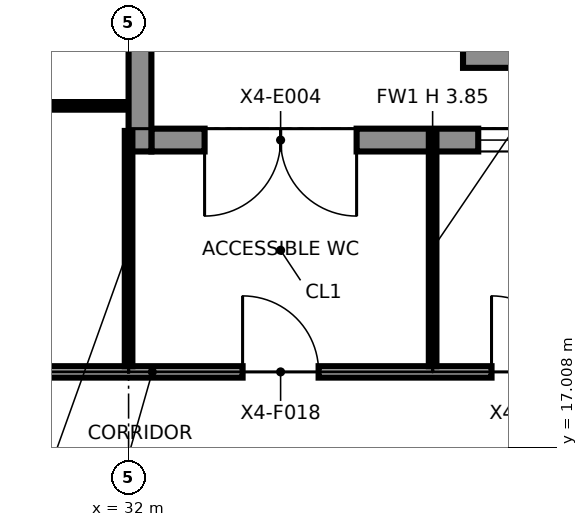
"""IFC4 building model, lengths in metres.
Left out: names, types, materials, properties, quantities, classifications, styles, units other than length and angle.
Written with IfcOpenShell. Run it as: python <this file> out.ifc"""

import sys

from ifc_helpers import new_model, si_unit, direction, frame, frame_2d, origin, place, context, subcontext, project, spatial, rectangle, extrude, element, fill, save


model = new_model("IFC4")
c1 = context("Model", 3, precision=1e-05, world=origin(), true_north=direction((0.0, 1.0)))
c2 = subcontext(c1, "Body", "Model", "MODEL_VIEW")
j1 = project(units=[si_unit("LENGTHUNIT", "METRE"), si_unit("PLANEANGLEUNIT", "RADIAN")], contexts=[c1])
p1 = place(None, origin())
s1 = spatial("IfcSite", under=j1, at=p1, CompositionType="ELEMENT")
p2 = place(p1, origin())
s2 = spatial("IfcBuilding", under=s1, at=p2, CompositionType="ELEMENT")
p3 = place(p2, frame((0.0, 0.0, 279.0)))
s3 = spatial("IfcBuildingStorey", under=s2, at=p3, CompositionType="ELEMENT", Elevation=279.0)
p4 = place(p3, frame((39.7, 21.05, 0.0), z_axis=(0.0, 0.0, 1.0), x_axis=(-1.0, 0.0, 0.0)))
e1 = element("IfcWall", 1, at=p4, inside=s3, PredefinedType="SOLIDWALL", context=c2, shape_type="SweptSolid", body=[
    extrude(rectangle(XDim=7.4, YDim=0.3, at=frame_2d((3.7, 0.0))), origin(), (0.0, 0.0, 1.0), 3.85),
])
p5 = place(p4, frame((0.3, 0.0, 0.9)))
e2 = element("IfcOpeningElement", 2, at=p5, cuts=e1, PredefinedType="OPENING", context=c2, shape_type="SweptSolid", body=[
    extrude(rectangle(XDim=2.8, YDim=2.2, at=frame_2d((1.4, 1.1))), frame((0.0, 0.16, 0.0), z_axis=(0.0, -1.0, 0.0), x_axis=(1.0, 0.0, 0.0)), (0.0, 0.0, 1.0), 0.32),
])
p6 = place(p4, frame((4.7, 0.0, 0.0)))
e3 = element("IfcOpeningElement", 3, at=p6, cuts=e1, PredefinedType="OPENING", context=c2, shape_type="SweptSolid", body=[
    extrude(rectangle(XDim=2.0, YDim=2.4, at=frame_2d((1.0, 1.2))), frame((0.0, 0.16, 0.0), z_axis=(0.0, -1.0, 0.0), x_axis=(1.0, 0.0, 0.0)), (0.0, 0.0, 1.0), 0.32),
])
p7 = place(p3, frame((32.15, 23.9, 0.0), z_axis=(0.0, 0.0, 1.0), x_axis=(0.0, -1.0, 0.0)))
e4 = element("IfcWall", 4, at=p7, inside=s3, PredefinedType="SOLIDWALL", context=c2, shape_type="SweptSolid", body=[
    extrude(rectangle(XDim=3.0, YDim=0.3, at=frame_2d((1.5, 0.0))), origin(), (0.0, 0.0, 1.0), 3.247),
])
p8 = place(p3, frame((39.6, 22.45, 0.0), z_axis=(0.0, 0.0, 1.0), x_axis=(-1.0, 0.0, 0.0)))
e5 = element("IfcWall", 5, at=p8, inside=s3, PredefinedType="SOLIDWALL", context=c2, shape_type="SweptSolid", body=[
    extrude(rectangle(XDim=3.2, YDim=0.9, at=frame_2d((1.6, 0.0))), origin(), (0.0, 0.0, 1.0), 0.6),
])
p9 = place(p3, frame((26.075, 18.0, 0.0), z_axis=(0.0, 0.0, 1.0), x_axis=(1.0, 0.0, 0.0)))
e6 = element("IfcWall", 6, at=p9, inside=s3, PredefinedType="PARTITIONING", context=c2, shape_type="SweptSolid", body=[
    extrude(rectangle(XDim=12.475, YDim=0.15, at=frame_2d((6.238, 0.0))), origin(), (0.0, 0.0, 1.0), 3.85),
])
p10 = place(p9, frame((7.425, 0.0, 0.0)))
e7 = element("IfcOpeningElement", 7, at=p10, cuts=e6, PredefinedType="OPENING", context=c2, shape_type="SweptSolid", body=[
    extrude(rectangle(XDim=1.0, YDim=2.1, at=frame_2d((0.5, 1.05))), frame((0.0, 0.085, 0.0), z_axis=(0.0, -1.0, 0.0), x_axis=(1.0, 0.0, 0.0)), (0.0, 0.0, 1.0), 0.17),
])
p11 = place(p9, frame((10.7, 0.0, 0.0)))
e8 = element("IfcOpeningElement", 8, at=p11, cuts=e6, PredefinedType="OPENING", context=c2, shape_type="SweptSolid", body=[
    extrude(rectangle(XDim=1.0, YDim=2.1, at=frame_2d((0.5, 1.05))), frame((0.0, 0.085, 0.0), z_axis=(0.0, -1.0, 0.0), x_axis=(1.0, 0.0, 0.0)), (0.0, 0.0, 1.0), 0.17),
])
p12 = place(p9, frame((3.425, 0.0, 0.0)))
e9 = element("IfcOpeningElement", 9, at=p12, cuts=e6, PredefinedType="OPENING", context=c2, shape_type="SweptSolid", body=[
    extrude(rectangle(XDim=1.0, YDim=2.1, at=frame_2d((0.5, 1.05))), frame((0.0, 0.085, 0.0), z_axis=(0.0, -1.0, 0.0), x_axis=(1.0, 0.0, 0.0)), (0.0, 0.0, 1.0), 0.17),
])
for number, where, z_axis, x_axis in (
    (10, (32.0, 18.075, 0.0), (0.0, 0.0, 1.0), (0.0, 1.0, 0.0)),
    (11, (36.0, 18.075, 0.0), (0.0, 0.0, 1.0), (0.0, 1.0, 0.0)),
):
    element("IfcWall", number, at=place(p3, frame(where, z_axis=z_axis, x_axis=x_axis)), inside=s3, PredefinedType="PARTITIONING", context=c2, shape_type="SweptSolid", body=[
        extrude(rectangle(XDim=3.095, YDim=0.1, at=frame_2d((1.547, 0.0))), origin(), (0.0, 0.0, 1.0), 3.238),
    ])
p13 = place(p3, frame((28.05, 21.5, 0.0), z_axis=(0.0, 0.0, 1.0), x_axis=(1.0, 0.0, 0.0)))
e12 = element("IfcWall", 12, at=p13, inside=s3, PredefinedType="PARTITIONING", context=c2, shape_type="SweptSolid", body=[
    extrude(rectangle(XDim=3.92, YDim=0.1, at=frame_2d((1.96, 0.0))), origin(), (0.0, 0.0, 1.0), 3.85),
])
p14 = place(p13, frame((2.45, 0.0, 0.0), z_axis=(0.0, 0.0, 1.0), x_axis=(-1.0, 0.0, 0.0)))
e13 = element("IfcOpeningElement", 13, at=p14, cuts=e12, PredefinedType="OPENING", context=c2, shape_type="SweptSolid", body=[
    extrude(rectangle(XDim=1.0, YDim=2.1, at=frame_2d((0.5, 1.05))), frame((0.0, 0.06, 0.0), z_axis=(0.0, -1.0, 0.0), x_axis=(1.0, 0.0, 0.0)), (0.0, 0.0, 1.0), 0.12),
])
p15 = place(p5, origin())
e14 = element("IfcWindow", 14, at=p15, inside=s3, PartitioningType="SINGLE_PANEL", PredefinedType="WINDOW", context=c2, shape_type="SweptSolid", body=[
    extrude(rectangle(XDim=2.8, YDim=2.2, at=frame_2d((1.4, 1.1))), frame((0.0, 0.03, 0.0), z_axis=(0.0, -1.0, 0.0), x_axis=(1.0, 0.0, 0.0)), (0.0, 0.0, 1.0), 0.06),
])
fill(e2, e14)
p16 = place(p6, origin())
e15 = element("IfcDoor", 15, at=p16, inside=s3, OperationType="DOUBLE_DOOR_SINGLE_SWING", PredefinedType="DOOR", context=c2, shape_type="SweptSolid", body=[
    extrude(rectangle(XDim=2.0, YDim=2.4, at=frame_2d((1.0, 1.2))), frame((0.0, 0.025, 0.0), z_axis=(0.0, -1.0, 0.0), x_axis=(1.0, 0.0, 0.0)), (0.0, 0.0, 1.0), 0.05),
])
fill(e3, e15)
p17 = place(p10, origin())
e16 = element("IfcDoor", 16, at=p17, inside=s3, OperationType="SINGLE_SWING_LEFT", PredefinedType="DOOR", context=c2, shape_type="SweptSolid", body=[
    extrude(rectangle(XDim=1.0, YDim=2.1, at=frame_2d((0.5, 1.05))), frame((0.0, 0.025, 0.0), z_axis=(0.0, -1.0, 0.0), x_axis=(1.0, 0.0, 0.0)), (0.0, 0.0, 1.0), 0.05),
])
fill(e7, e16)
p18 = place(p11, origin())
e17 = element("IfcDoor", 17, at=p18, inside=s3, OperationType="SINGLE_SWING_LEFT", PredefinedType="DOOR", context=c2, shape_type="SweptSolid", body=[
    extrude(rectangle(XDim=1.0, YDim=2.1, at=frame_2d((0.5, 1.05))), frame((0.0, 0.025, 0.0), z_axis=(0.0, -1.0, 0.0), x_axis=(1.0, 0.0, 0.0)), (0.0, 0.0, 1.0), 0.05),
])
fill(e8, e17)
save(model, sys.argv[1])
